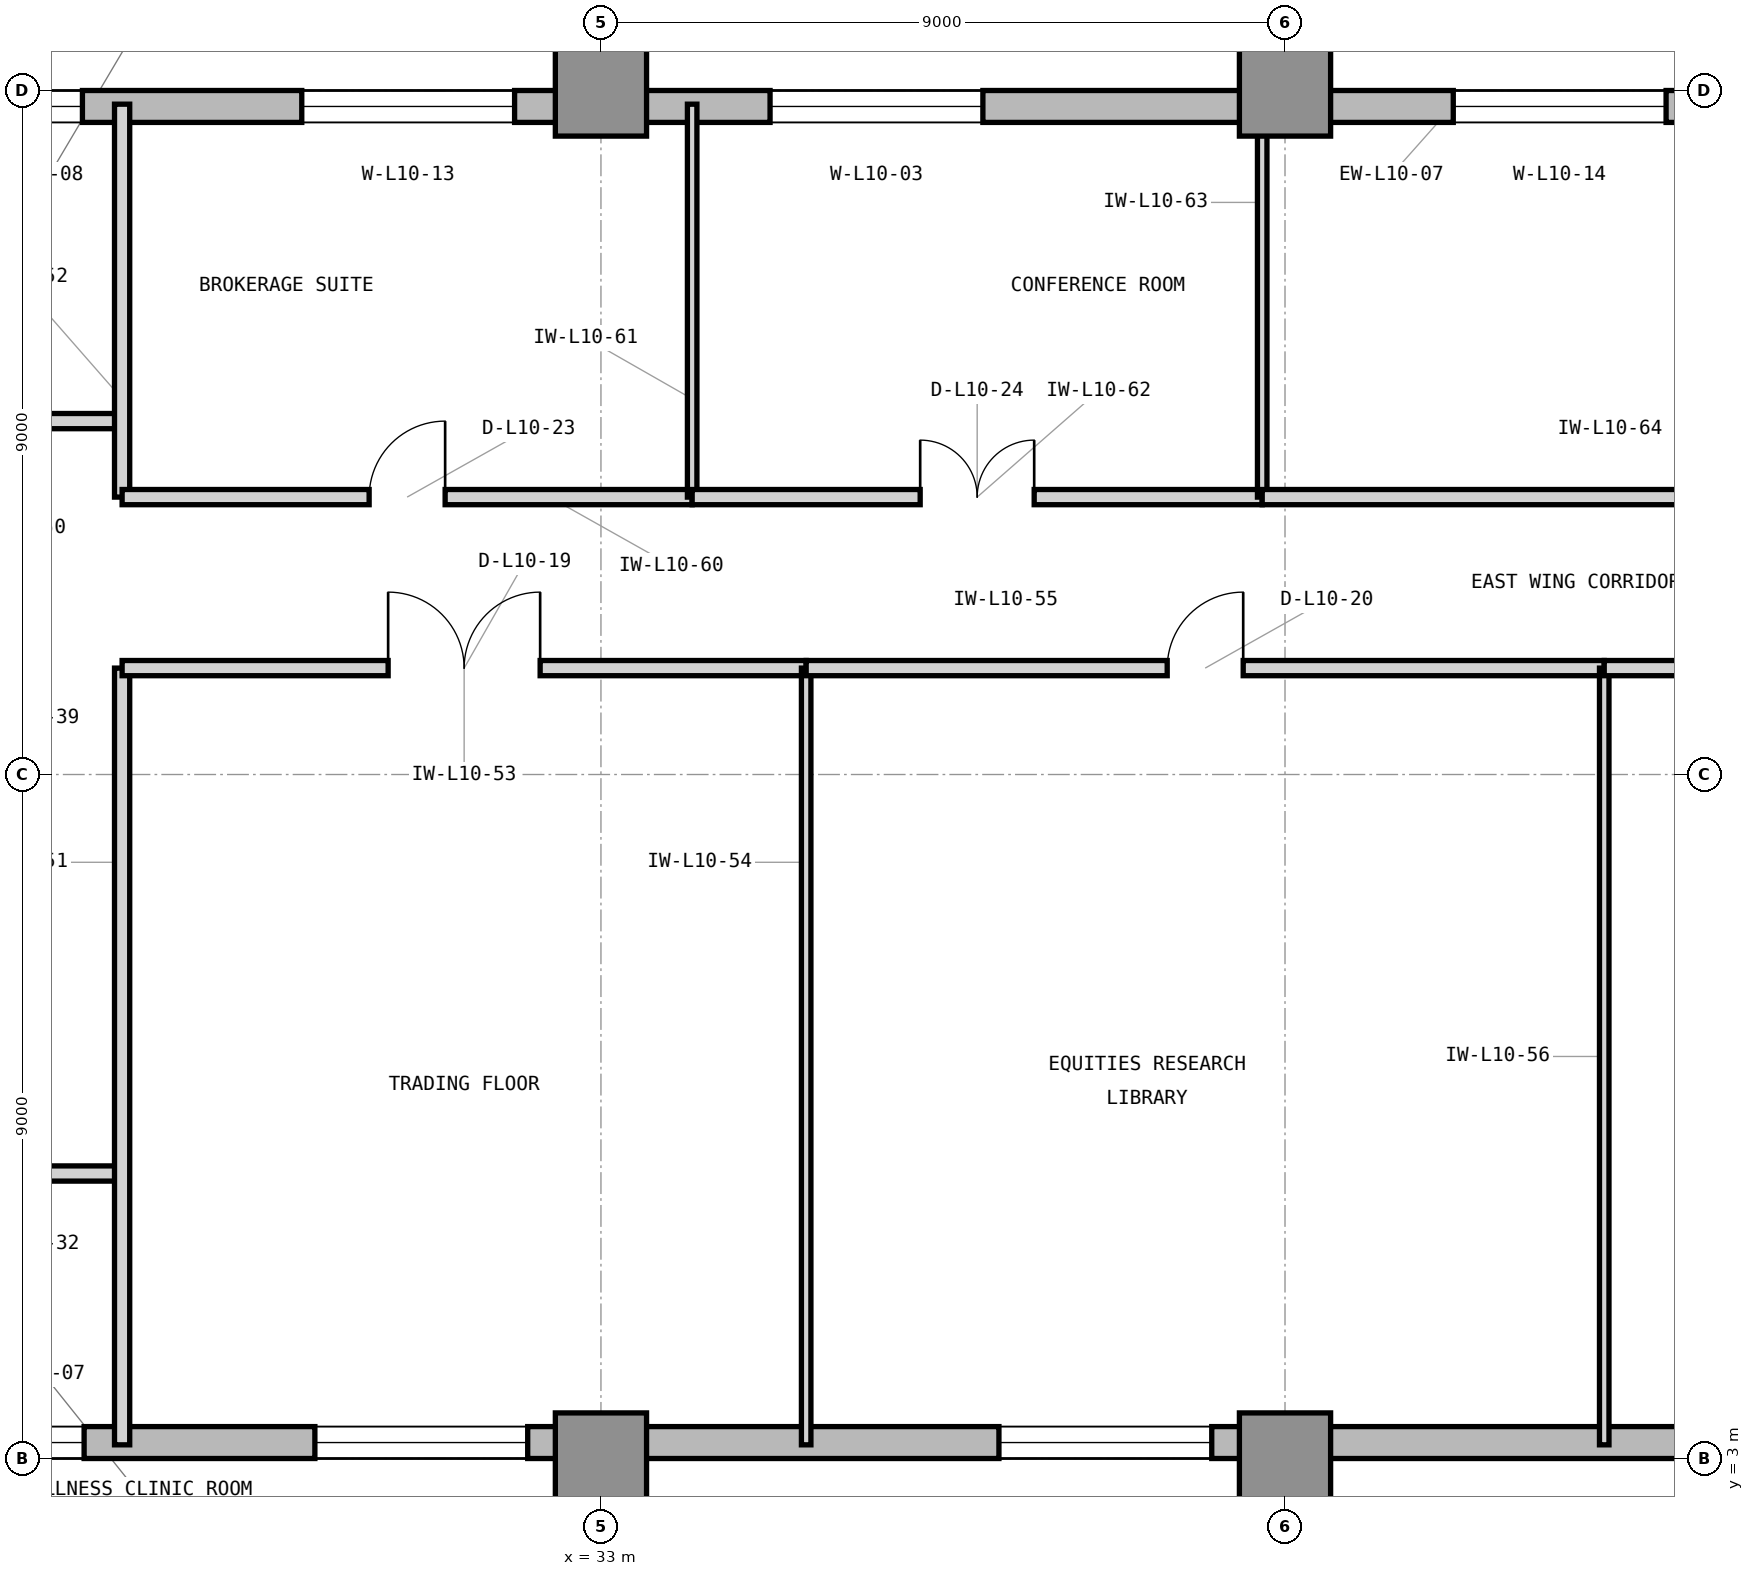
"""IFC4 building model, lengths in metres.
Left out: names, types, materials, properties, quantities, classifications, styles, units other than length and angle.
Written with IfcOpenShell. Run it as: python <this file> out.ifc"""

import sys

from ifc_helpers import new_model, si_unit, direction, frame, frame_2d, origin, origin_2d, place, context, subcontext, project, spatial, rectangle, extrude, element, fill, save


model = new_model("IFC4")
c1 = context("Model", 3, precision=1e-05, world=origin(), true_north=direction((0.0, 1.0)))
c2 = subcontext(c1, "Body", "Model", "MODEL_VIEW")
j1 = project(units=[si_unit("LENGTHUNIT", "METRE"), si_unit("PLANEANGLEUNIT", "RADIAN")], contexts=[c1])
p1 = place(None, origin())
s1 = spatial("IfcSite", under=j1, at=p1, CompositionType="ELEMENT")
p2 = place(p1, origin())
s2 = spatial("IfcBuilding", under=s1, at=p2, CompositionType="ELEMENT")
p3 = place(p2, frame((0.0, 0.0, 46.8)))
s3 = spatial("IfcBuildingStorey", under=s2, at=p3, CompositionType="ELEMENT", Elevation=46.8)
for number, where, z_axis, x_axis in (
    (1, (33.0, 3.0, 0.0), (0.0, 0.0, 1.0), (1.0, 0.0, 0.0)),
    (2, (33.0, 21.0, 0.0), (0.0, 0.0, 1.0), (1.0, 0.0, 0.0)),
    (3, (42.0, 3.0, 0.0), (0.0, 0.0, 1.0), (1.0, 0.0, 0.0)),
    (4, (42.0, 21.0, 0.0), (0.0, 0.0, 1.0), (1.0, 0.0, 0.0)),
):
    element("IfcColumn", number, at=place(p3, frame(where, z_axis=z_axis, x_axis=x_axis)), inside=s3, PredefinedType="COLUMN", context=c2, shape_type="SweptSolid", body=[
        extrude(rectangle(XDim=1.2, YDim=1.2, at=origin_2d()), origin(), (0.0, 0.0, 1.0), 4.2),
    ])
p4 = place(p3, frame((23.9, 3.21, 0.0), z_axis=(0.0, 0.0, 1.0), x_axis=(1.0, 0.0, 0.0)))
e5 = element("IfcWall", 5, at=p4, inside=s3, PredefinedType="STANDARD", context=c2, shape_type="SweptSolid", body=[
    extrude(rectangle(XDim=40.5, YDim=0.42, at=frame_2d((20.25, 0.0))), origin(), (0.0, 0.0, 1.0), 3.98),
])
p5 = place(p4, frame((1.1, 0.0, 0.85)))
e6 = element("IfcOpeningElement", 6, at=p5, cuts=e5, PredefinedType="OPENING", context=c2, shape_type="SweptSolid", body=[
    extrude(rectangle(XDim=1.2, YDim=2.45, at=frame_2d((0.6, 1.225))), frame((0.0, 0.22, 0.0), z_axis=(0.0, -1.0, 0.0), x_axis=(1.0, 0.0, 0.0)), (0.0, 0.0, 1.0), 0.44),
])
p6 = place(p4, frame((5.336, 0.0, 0.85)))
e7 = element("IfcOpeningElement", 7, at=p6, cuts=e5, PredefinedType="OPENING", context=c2, shape_type="SweptSolid", body=[
    extrude(rectangle(XDim=2.8, YDim=2.45, at=frame_2d((1.4, 1.225))), frame((0.0, 0.22, 0.0), z_axis=(0.0, -1.0, 0.0), x_axis=(1.0, 0.0, 0.0)), (0.0, 0.0, 1.0), 0.44),
])
p7 = place(p4, frame((14.336, 0.0, 0.85)))
e8 = element("IfcOpeningElement", 8, at=p7, cuts=e5, PredefinedType="OPENING", context=c2, shape_type="SweptSolid", body=[
    extrude(rectangle(XDim=2.8, YDim=2.45, at=frame_2d((1.4, 1.225))), frame((0.0, 0.22, 0.0), z_axis=(0.0, -1.0, 0.0), x_axis=(1.0, 0.0, 0.0)), (0.0, 0.0, 1.0), 0.44),
])
p8 = place(p4, frame((25.136, 0.0, 0.85)))
e9 = element("IfcOpeningElement", 9, at=p8, cuts=e5, PredefinedType="OPENING", context=c2, shape_type="SweptSolid", body=[
    extrude(rectangle(XDim=1.2, YDim=2.45, at=frame_2d((0.6, 1.225))), frame((0.0, 0.22, 0.0), z_axis=(0.0, -1.0, 0.0), x_axis=(1.0, 0.0, 0.0)), (0.0, 0.0, 1.0), 0.44),
])
p9 = place(p4, frame((34.086, 0.0, 0.85)))
e10 = element("IfcOpeningElement", 10, at=p9, cuts=e5, PredefinedType="OPENING", context=c2, shape_type="SweptSolid", body=[
    extrude(rectangle(XDim=1.2, YDim=2.45, at=frame_2d((0.6, 1.225))), frame((0.0, 0.22, 0.0), z_axis=(0.0, -1.0, 0.0), x_axis=(1.0, 0.0, 0.0)), (0.0, 0.0, 1.0), 0.44),
])
p10 = place(p3, frame((64.4, 20.79, 0.0), z_axis=(0.0, 0.0, 1.0), x_axis=(-1.0, 0.0, 0.0)))
e11 = element("IfcWall", 11, at=p10, inside=s3, PredefinedType="STANDARD", context=c2, shape_type="SweptSolid", body=[
    extrude(rectangle(XDim=40.4, YDim=0.42, at=frame_2d((20.2, 0.0))), origin(), (0.0, 0.0, 1.0), 3.98),
])
p11 = place(p10, frame((26.375, 0.0, 0.85)))
e12 = element("IfcOpeningElement", 12, at=p11, cuts=e11, PredefinedType="OPENING", context=c2, shape_type="SweptSolid", body=[
    extrude(rectangle(XDim=2.8, YDim=2.45, at=frame_2d((1.4, 1.225))), frame((0.0, 0.22, 0.0), z_axis=(0.0, -1.0, 0.0), x_axis=(1.0, 0.0, 0.0)), (0.0, 0.0, 1.0), 0.44),
])
p12 = place(p10, frame((38.222, 0.0, 0.85)))
e13 = element("IfcOpeningElement", 13, at=p12, cuts=e11, PredefinedType="OPENING", context=c2, shape_type="SweptSolid", body=[
    extrude(rectangle(XDim=1.2, YDim=2.45, at=frame_2d((0.6, 1.225))), frame((0.0, 0.22, 0.0), z_axis=(0.0, -1.0, 0.0), x_axis=(1.0, 0.0, 0.0)), (0.0, 0.0, 1.0), 0.44),
])
p13 = place(p10, frame((32.536, 0.0, 0.85)))
e14 = element("IfcOpeningElement", 14, at=p13, cuts=e11, PredefinedType="OPENING", context=c2, shape_type="SweptSolid", body=[
    extrude(rectangle(XDim=2.8, YDim=2.45, at=frame_2d((1.4, 1.225))), frame((0.0, 0.22, 0.0), z_axis=(0.0, -1.0, 0.0), x_axis=(1.0, 0.0, 0.0)), (0.0, 0.0, 1.0), 0.44),
])
p14 = place(p10, frame((17.386, 0.0, 0.85)))
e15 = element("IfcOpeningElement", 15, at=p14, cuts=e11, PredefinedType="OPENING", context=c2, shape_type="SweptSolid", body=[
    extrude(rectangle(XDim=2.8, YDim=2.45, at=frame_2d((1.4, 1.225))), frame((0.0, 0.22, 0.0), z_axis=(0.0, -1.0, 0.0), x_axis=(1.0, 0.0, 0.0)), (0.0, 0.0, 1.0), 0.44),
])
p15 = place(p3, frame((23.85, 6.75, 0.0), z_axis=(0.0, 0.0, 1.0), x_axis=(1.0, 0.0, 0.0)))
e16 = element("IfcWall", 16, at=p15, inside=s3, PredefinedType="PARTITIONING", context=c2, shape_type="SweptSolid", body=[
    extrude(rectangle(XDim=2.85, YDim=0.2, at=frame_2d((1.425, 0.0))), origin(), (0.0, 0.0, 1.0), 3.97),
])
p16 = place(p15, frame((0.7, 0.0, 0.0)))
e17 = element("IfcOpeningElement", 17, at=p16, cuts=e16, PredefinedType="OPENING", context=c2, shape_type="SweptSolid", body=[
    extrude(rectangle(XDim=1.0, YDim=2.15, at=frame_2d((0.5, 1.075))), frame((0.0, 0.11, 0.0), z_axis=(0.0, -1.0, 0.0), x_axis=(1.0, 0.0, 0.0)), (0.0, 0.0, 1.0), 0.22),
])
p17 = place(p3, frame((23.85, 16.65, 0.0), z_axis=(0.0, 0.0, 1.0), x_axis=(1.0, 0.0, 0.0)))
e18 = element("IfcWall", 18, at=p17, inside=s3, PredefinedType="PARTITIONING", context=c2, shape_type="SweptSolid", body=[
    extrude(rectangle(XDim=2.85, YDim=0.2, at=frame_2d((1.425, 0.0))), origin(), (0.0, 0.0, 1.0), 3.97),
])
p18 = place(p17, frame((0.7, 0.0, 0.0)))
e19 = element("IfcOpeningElement", 19, at=p18, cuts=e18, PredefinedType="OPENING", context=c2, shape_type="SweptSolid", body=[
    extrude(rectangle(XDim=1.0, YDim=2.15, at=frame_2d((0.5, 1.075))), frame((0.0, 0.11, 0.0), z_axis=(0.0, -1.0, 0.0), x_axis=(1.0, 0.0, 0.0)), (0.0, 0.0, 1.0), 0.22),
])
p19 = place(p3, frame((26.7, 3.18, 0.0), z_axis=(0.0, 0.0, 1.0), x_axis=(0.0, 1.0, 0.0)))
e20 = element("IfcWall", 20, at=p19, inside=s3, PredefinedType="PARTITIONING", context=c2, shape_type="SweptSolid", body=[
    extrude(rectangle(XDim=10.22, YDim=0.2, at=frame_2d((5.11, 0.0))), origin(), (0.0, 0.0, 1.0), 3.97),
])
p20 = place(p3, frame((26.7, 15.65, 0.0), z_axis=(0.0, 0.0, 1.0), x_axis=(0.0, 1.0, 0.0)))
e21 = element("IfcWall", 21, at=p20, inside=s3, PredefinedType="PARTITIONING", context=c2, shape_type="SweptSolid", body=[
    extrude(rectangle(XDim=5.17, YDim=0.2, at=frame_2d((2.585, 0.0))), origin(), (0.0, 0.0, 1.0), 3.97),
])
p21 = place(p3, frame((26.7, 13.4, 0.0), z_axis=(0.0, 0.0, 1.0), x_axis=(1.0, 0.0, 0.0)))
e22 = element("IfcWall", 22, at=p21, inside=s3, PredefinedType="PARTITIONING", context=c2, shape_type="SweptSolid", body=[
    extrude(rectangle(XDim=9.0, YDim=0.2, at=frame_2d((4.5, 0.0))), origin(), (0.0, 0.0, 1.0), 3.97),
])
p22 = place(p21, frame((3.5, 0.0, 0.0)))
e23 = element("IfcOpeningElement", 23, at=p22, cuts=e22, PredefinedType="OPENING", context=c2, shape_type="SweptSolid", body=[
    extrude(rectangle(XDim=2.0, YDim=2.5, at=frame_2d((1.0, 1.25))), frame((0.0, 0.11, 0.0), z_axis=(0.0, -1.0, 0.0), x_axis=(1.0, 0.0, 0.0)), (0.0, 0.0, 1.0), 0.22),
])
p23 = place(p3, frame((35.7, 3.18, 0.0), z_axis=(0.0, 0.0, 1.0), x_axis=(0.0, 1.0, 0.0)))
e24 = element("IfcWall", 24, at=p23, inside=s3, PredefinedType="PARTITIONING", context=c2, shape_type="SweptSolid", body=[
    extrude(rectangle(XDim=10.22, YDim=0.125, at=frame_2d((5.11, 0.0))), origin(), (0.0, 0.0, 1.0), 3.97),
])
p24 = place(p3, frame((35.7, 13.4, 0.0), z_axis=(0.0, 0.0, 1.0), x_axis=(1.0, 0.0, 0.0)))
e25 = element("IfcWall", 25, at=p24, inside=s3, PredefinedType="PARTITIONING", context=c2, shape_type="SweptSolid", body=[
    extrude(rectangle(XDim=10.5, YDim=0.2, at=frame_2d((5.25, 0.0))), origin(), (0.0, 0.0, 1.0), 3.97),
])
p25 = place(p24, frame((4.75, 0.0, 0.0)))
e26 = element("IfcOpeningElement", 26, at=p25, cuts=e25, PredefinedType="OPENING", context=c2, shape_type="SweptSolid", body=[
    extrude(rectangle(XDim=1.0, YDim=2.15, at=frame_2d((0.5, 1.075))), frame((0.0, 0.11, 0.0), z_axis=(0.0, -1.0, 0.0), x_axis=(1.0, 0.0, 0.0)), (0.0, 0.0, 1.0), 0.22),
])
p26 = place(p3, frame((46.2, 3.18, 0.0), z_axis=(0.0, 0.0, 1.0), x_axis=(0.0, 1.0, 0.0)))
e27 = element("IfcWall", 27, at=p26, inside=s3, PredefinedType="PARTITIONING", context=c2, shape_type="SweptSolid", body=[
    extrude(rectangle(XDim=10.22, YDim=0.125, at=frame_2d((5.11, 0.0))), origin(), (0.0, 0.0, 1.0), 3.97),
])
p27 = place(p3, frame((46.2, 13.4, 0.0), z_axis=(0.0, 0.0, 1.0), x_axis=(1.0, 0.0, 0.0)))
e28 = element("IfcWall", 28, at=p27, inside=s3, PredefinedType="PARTITIONING", context=c2, shape_type="SweptSolid", body=[
    extrude(rectangle(XDim=9.0, YDim=0.2, at=frame_2d((4.5, 0.0))), origin(), (0.0, 0.0, 1.0), 3.97),
])
p28 = place(p27, frame((4.0, 0.0, 0.0)))
e29 = element("IfcOpeningElement", 29, at=p28, cuts=e28, PredefinedType="OPENING", context=c2, shape_type="SweptSolid", body=[
    extrude(rectangle(XDim=1.0, YDim=2.15, at=frame_2d((0.5, 1.075))), frame((0.0, 0.11, 0.0), z_axis=(0.0, -1.0, 0.0), x_axis=(1.0, 0.0, 0.0)), (0.0, 0.0, 1.0), 0.22),
])
p29 = place(p3, frame((26.7, 15.65, 0.0), z_axis=(0.0, 0.0, 1.0), x_axis=(1.0, 0.0, 0.0)))
e30 = element("IfcWall", 30, at=p29, inside=s3, PredefinedType="PARTITIONING", context=c2, shape_type="SweptSolid", body=[
    extrude(rectangle(XDim=7.5, YDim=0.2, at=frame_2d((3.75, 0.0))), origin(), (0.0, 0.0, 1.0), 3.97),
])
p30 = place(p29, frame((3.25, 0.0, 0.0)))
e31 = element("IfcOpeningElement", 31, at=p30, cuts=e30, PredefinedType="OPENING", context=c2, shape_type="SweptSolid", body=[
    extrude(rectangle(XDim=1.0, YDim=2.15, at=frame_2d((0.5, 1.075))), frame((0.0, 0.11, 0.0), z_axis=(0.0, -1.0, 0.0), x_axis=(1.0, 0.0, 0.0)), (0.0, 0.0, 1.0), 0.22),
])
p31 = place(p3, frame((34.2, 15.65, 0.0), z_axis=(0.0, 0.0, 1.0), x_axis=(0.0, 1.0, 0.0)))
e32 = element("IfcWall", 32, at=p31, inside=s3, PredefinedType="PARTITIONING", context=c2, shape_type="SweptSolid", body=[
    extrude(rectangle(XDim=5.17, YDim=0.125, at=frame_2d((2.585, 0.0))), origin(), (0.0, 0.0, 1.0), 3.97),
])
p32 = place(p3, frame((34.2, 15.65, 0.0), z_axis=(0.0, 0.0, 1.0), x_axis=(1.0, 0.0, 0.0)))
e33 = element("IfcWall", 33, at=p32, inside=s3, PredefinedType="PARTITIONING", context=c2, shape_type="SweptSolid", body=[
    extrude(rectangle(XDim=7.5, YDim=0.2, at=frame_2d((3.75, 0.0))), origin(), (0.0, 0.0, 1.0), 3.97),
])
p33 = place(p32, frame((3.0, 0.0, 0.0)))
e34 = element("IfcOpeningElement", 34, at=p33, cuts=e33, PredefinedType="OPENING", context=c2, shape_type="SweptSolid", body=[
    extrude(rectangle(XDim=1.5, YDim=2.3, at=frame_2d((0.75, 1.15))), frame((0.0, 0.11, 0.0), z_axis=(0.0, -1.0, 0.0), x_axis=(1.0, 0.0, 0.0)), (0.0, 0.0, 1.0), 0.22),
])
p34 = place(p3, frame((41.7, 15.65, 0.0), z_axis=(0.0, 0.0, 1.0), x_axis=(0.0, 1.0, 0.0)))
e35 = element("IfcWall", 35, at=p34, inside=s3, PredefinedType="PARTITIONING", context=c2, shape_type="SweptSolid", body=[
    extrude(rectangle(XDim=5.17, YDim=0.125, at=frame_2d((2.585, 0.0))), origin(), (0.0, 0.0, 1.0), 3.97),
])
p35 = place(p3, frame((41.7, 15.65, 0.0), z_axis=(0.0, 0.0, 1.0), x_axis=(1.0, 0.0, 0.0)))
e36 = element("IfcWall", 36, at=p35, inside=s3, PredefinedType="PARTITIONING", context=c2, shape_type="SweptSolid", body=[
    extrude(rectangle(XDim=18.3, YDim=0.2, at=frame_2d((9.15, 0.0))), origin(), (0.0, 0.0, 1.0), 3.97),
])
p36 = place(p35, frame((8.65, 0.0, 0.0)))
e37 = element("IfcOpeningElement", 37, at=p36, cuts=e36, PredefinedType="OPENING", context=c2, shape_type="SweptSolid", body=[
    extrude(rectangle(XDim=1.0, YDim=2.15, at=frame_2d((0.5, 1.075))), frame((0.0, 0.11, 0.0), z_axis=(0.0, -1.0, 0.0), x_axis=(1.0, 0.0, 0.0)), (0.0, 0.0, 1.0), 0.22),
])
p37 = place(p11, origin())
e38 = element("IfcWindow", 38, at=p37, inside=s3, PartitioningType="SINGLE_PANEL", PredefinedType="WINDOW", context=c2, shape_type="SweptSolid", body=[
    extrude(rectangle(XDim=2.8, YDim=2.45, at=frame_2d((1.4, 1.225))), frame((0.0, 0.11, 0.0), z_axis=(0.0, -1.0, 0.0), x_axis=(1.0, 0.0, 0.0)), (0.0, 0.0, 1.0), 0.06),
])
fill(e12, e38)
p38 = place(p22, origin())
e39 = element("IfcDoor", 39, at=p38, inside=s3, OperationType="DOUBLE_DOOR_SINGLE_SWING", PredefinedType="DOOR", context=c2, shape_type="SweptSolid", body=[
    extrude(rectangle(XDim=2.0, YDim=2.5, at=frame_2d((1.0, 1.25))), frame((0.0, 0.025, 0.0), z_axis=(0.0, -1.0, 0.0), x_axis=(1.0, 0.0, 0.0)), (0.0, 0.0, 1.0), 0.05),
])
fill(e23, e39)
p39 = place(p25, origin())
e40 = element("IfcDoor", 40, at=p39, inside=s3, OperationType="SINGLE_SWING_RIGHT", PredefinedType="DOOR", context=c2, shape_type="SweptSolid", body=[
    extrude(rectangle(XDim=1.0, YDim=2.15, at=frame_2d((0.5, 1.075))), frame((0.0, 0.025, 0.0), z_axis=(0.0, -1.0, 0.0), x_axis=(1.0, 0.0, 0.0)), (0.0, 0.0, 1.0), 0.05),
])
fill(e26, e40)
p40 = place(p30, origin())
e41 = element("IfcDoor", 41, at=p40, inside=s3, OperationType="SINGLE_SWING_RIGHT", PredefinedType="DOOR", context=c2, shape_type="SweptSolid", body=[
    extrude(rectangle(XDim=1.0, YDim=2.15, at=frame_2d((0.5, 1.075))), frame((0.0, 0.025, 0.0), z_axis=(0.0, -1.0, 0.0), x_axis=(1.0, 0.0, 0.0)), (0.0, 0.0, 1.0), 0.05),
])
fill(e31, e41)
p41 = place(p33, origin())
e42 = element("IfcDoor", 42, at=p41, inside=s3, OperationType="DOUBLE_DOOR_SINGLE_SWING", PredefinedType="DOOR", context=c2, shape_type="SweptSolid", body=[
    extrude(rectangle(XDim=1.5, YDim=2.3, at=frame_2d((0.75, 1.15))), frame((0.0, 0.025, 0.0), z_axis=(0.0, -1.0, 0.0), x_axis=(1.0, 0.0, 0.0)), (0.0, 0.0, 1.0), 0.05),
])
fill(e34, e42)
p42 = place(p5, origin())
e43 = element("IfcWindow", 43, at=p42, inside=s3, PartitioningType="SINGLE_PANEL", PredefinedType="WINDOW", context=c2, shape_type="SweptSolid", body=[
    extrude(rectangle(XDim=1.2, YDim=2.45, at=frame_2d((0.6, 1.225))), frame((0.0, 0.11, 0.0), z_axis=(0.0, -1.0, 0.0), x_axis=(1.0, 0.0, 0.0)), (0.0, 0.0, 1.0), 0.06),
])
fill(e6, e43)
p43 = place(p12, origin())
e44 = element("IfcWindow", 44, at=p43, inside=s3, PartitioningType="SINGLE_PANEL", PredefinedType="WINDOW", context=c2, shape_type="SweptSolid", body=[
    extrude(rectangle(XDim=1.2, YDim=2.45, at=frame_2d((0.6, 1.225))), frame((0.0, 0.11, 0.0), z_axis=(0.0, -1.0, 0.0), x_axis=(1.0, 0.0, 0.0)), (0.0, 0.0, 1.0), 0.06),
])
fill(e13, e44)
p44 = place(p6, origin())
e45 = element("IfcWindow", 45, at=p44, inside=s3, PartitioningType="SINGLE_PANEL", PredefinedType="WINDOW", context=c2, shape_type="SweptSolid", body=[
    extrude(rectangle(XDim=2.8, YDim=2.45, at=frame_2d((1.4, 1.225))), frame((0.0, 0.11, 0.0), z_axis=(0.0, -1.0, 0.0), x_axis=(1.0, 0.0, 0.0)), (0.0, 0.0, 1.0), 0.06),
])
fill(e7, e45)
p45 = place(p7, origin())
e46 = element("IfcWindow", 46, at=p45, inside=s3, PartitioningType="SINGLE_PANEL", PredefinedType="WINDOW", context=c2, shape_type="SweptSolid", body=[
    extrude(rectangle(XDim=2.8, YDim=2.45, at=frame_2d((1.4, 1.225))), frame((0.0, 0.11, 0.0), z_axis=(0.0, -1.0, 0.0), x_axis=(1.0, 0.0, 0.0)), (0.0, 0.0, 1.0), 0.06),
])
fill(e8, e46)
p46 = place(p13, origin())
e47 = element("IfcWindow", 47, at=p46, inside=s3, PartitioningType="SINGLE_PANEL", PredefinedType="WINDOW", context=c2, shape_type="SweptSolid", body=[
    extrude(rectangle(XDim=2.8, YDim=2.45, at=frame_2d((1.4, 1.225))), frame((0.0, 0.11, 0.0), z_axis=(0.0, -1.0, 0.0), x_axis=(1.0, 0.0, 0.0)), (0.0, 0.0, 1.0), 0.06),
])
fill(e14, e47)
p47 = place(p14, origin())
e48 = element("IfcWindow", 48, at=p47, inside=s3, PartitioningType="SINGLE_PANEL", PredefinedType="WINDOW", context=c2, shape_type="SweptSolid", body=[
    extrude(rectangle(XDim=2.8, YDim=2.45, at=frame_2d((1.4, 1.225))), frame((0.0, 0.11, 0.0), z_axis=(0.0, -1.0, 0.0), x_axis=(1.0, 0.0, 0.0)), (0.0, 0.0, 1.0), 0.06),
])
fill(e15, e48)
save(model, sys.argv[1])
